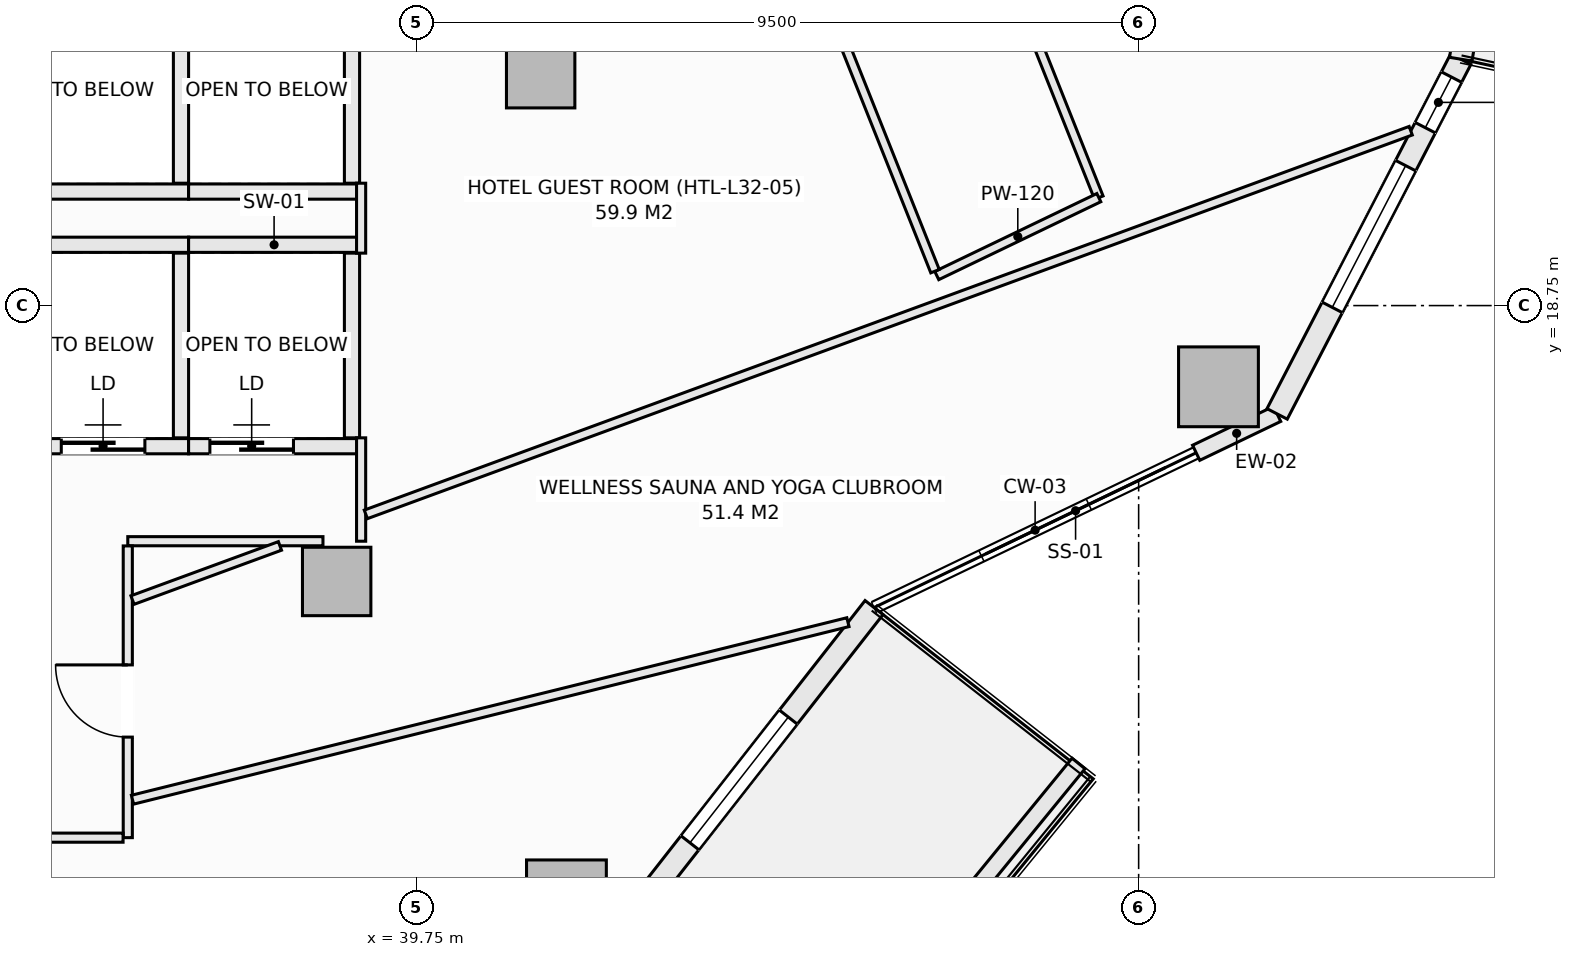
"""IFC4 building model, lengths in metres.
Left out: names, types, materials, properties, quantities, classifications, styles, units other than length and angle.
Written with IfcOpenShell. Run it as: python <this file> out.ifc"""

import sys

from ifc_helpers import new_model, si_unit, direction, frame, frame_2d, origin, origin_2d, place, context, subcontext, project, spatial, rectangle, extrude, element, fill, save


model = new_model("IFC4")
c1 = context("Model", 3, precision=1e-05, world=origin(), true_north=direction((0.0, 1.0)))
c2 = subcontext(c1, "Body", "Model", "MODEL_VIEW")
j1 = project(units=[si_unit("LENGTHUNIT", "METRE"), si_unit("PLANEANGLEUNIT", "RADIAN")], contexts=[c1])
p1 = place(None, origin())
s1 = spatial("IfcSite", under=j1, at=p1, CompositionType="ELEMENT")
p2 = place(p1, origin())
s2 = spatial("IfcBuilding", under=s1, at=p2, CompositionType="ELEMENT")
p3 = place(p2, frame((0.0, 0.0, 129.1)))
s3 = spatial("IfcBuildingStorey", under=s2, at=p3, CompositionType="ELEMENT", Elevation=129.1)
for number, where, z_axis, x_axis in (
    (1, (41.721, 10.932, -0.27), (0.0, 0.0, 1.0), (1.0, 0.0, 0.0)),
    (2, (50.3, 17.681, -0.27), (0.0, 0.0, 1.0), (1.0, 0.0, 0.0)),
):
    element("IfcColumn", number, at=place(p3, frame(where, z_axis=z_axis, x_axis=x_axis)), inside=s3, PredefinedType="COLUMN", context=c2, shape_type="SweptSolid", body=[
        extrude(rectangle(XDim=1.05, YDim=1.05, at=origin_2d()), origin(), (0.0, 0.0, 1.0), 3.4),
    ])
for number, where, z_axis, x_axis in (
    (3, (38.698, 15.121, -0.27), (0.0, 0.0, 1.0), (1.0, 0.0, 0.0)),
    (4, (41.382, 21.801, -0.27), (0.0, 0.0, 1.0), (1.0, 0.0, 0.0)),
):
    element("IfcColumn", number, at=place(p3, frame(where, z_axis=z_axis, x_axis=x_axis)), inside=s3, PredefinedType="COLUMN", context=c2, shape_type="SweptSolid", body=[
        extrude(rectangle(XDim=0.9, YDim=0.9, at=origin_2d()), origin(), (0.0, 0.0, 1.0), 3.4),
    ])
p4 = place(p3, frame((42.219, 10.242, 0.0), z_axis=(0.0, 0.0, 1.0), x_axis=(0.616435134162, 0.787405693001, 0.0)))
e5 = element("IfcWall", 5, at=p4, inside=s3, PredefinedType="SOLIDWALL", context=c2, shape_type="SweptSolid", body=[
    extrude(rectangle(XDim=5.759, YDim=0.3, at=frame_2d((2.879, 0.0))), origin(), (0.0, 0.0, 1.0), 2.653),
])
p5 = place(p4, frame((1.829, 0.0, 0.74)))
e6 = element("IfcOpeningElement", 6, at=p5, cuts=e5, PredefinedType="OPENING", context=c2, shape_type="SweptSolid", body=[
    extrude(rectangle(XDim=2.1, YDim=1.7, at=frame_2d((1.05, 0.85))), frame((0.0, 0.16, 0.0), z_axis=(0.0, -1.0, 0.0), x_axis=(1.0, 0.0, 0.0)), (0.0, 0.0, 1.0), 0.32),
])
p6 = place(p3, frame((50.007, 16.813, 0.0), z_axis=(0.0, 0.0, 1.0), x_axis=(0.90138115854, 0.433026566193, 0.0)))
e7 = element("IfcWall", 7, at=p6, inside=s3, PredefinedType="SOLIDWALL", context=c2, shape_type="SweptSolid", body=[
    extrude(rectangle(XDim=1.182, YDim=0.22, at=frame_2d((0.591, 0.0))), origin(), (0.0, 0.0, 1.0), 2.653),
])
p7 = place(p3, frame((51.072, 17.325, 0.0), z_axis=(0.0, 0.0, 1.0), x_axis=(0.459767899643, 0.888039119892, 0.0)))
e8 = element("IfcWall", 8, at=p7, inside=s3, PredefinedType="SOLIDWALL", context=c2, shape_type="SweptSolid", body=[
    extrude(rectangle(XDim=5.255, YDim=0.3, at=frame_2d((2.628, 0.0))), origin(), (0.0, 0.0, 1.0), 2.653),
])
p8 = place(p7, frame((1.578, 0.0, 0.74)))
e9 = element("IfcOpeningElement", 9, at=p8, cuts=e8, PredefinedType="OPENING", context=c2, shape_type="SweptSolid", body=[
    extrude(rectangle(XDim=2.1, YDim=1.7, at=frame_2d((1.05, 0.85))), frame((0.0, 0.16, 0.0), z_axis=(0.0, -1.0, 0.0), x_axis=(1.0, 0.0, 0.0)), (0.0, 0.0, 1.0), 0.32),
])
p9 = place(p7, frame((4.24, 0.0, 0.72)))
e10 = element("IfcOpeningElement", 10, at=p9, cuts=e8, PredefinedType="OPENING", context=c2, shape_type="SweptSolid", body=[
    extrude(rectangle(XDim=0.75, YDim=1.65, at=frame_2d((0.375, 0.825))), frame((0.0, 0.16, 0.0), z_axis=(0.0, -1.0, 0.0), x_axis=(1.0, 0.0, 0.0)), (0.0, 0.0, 1.0), 0.32),
])
p10 = place(p3, frame((53.488, 21.992, 0.0), z_axis=(0.0, 0.0, 1.0), x_axis=(0.162393944769, 0.986726003864, 0.0)))
e11 = element("IfcWall", 11, at=p10, inside=s3, PredefinedType="SOLIDWALL", context=c2, shape_type="SweptSolid", body=[
    extrude(rectangle(XDim=5.075, YDim=0.3, at=frame_2d((2.538, 0.0))), origin(), (0.0, 0.0, 1.0), 2.653),
])
p11 = place(p10, frame((2.78, 0.0, 0.72)))
e12 = element("IfcOpeningElement", 12, at=p11, cuts=e11, PredefinedType="OPENING", context=c2, shape_type="SweptSolid", body=[
    extrude(rectangle(XDim=1.2, YDim=1.65, at=frame_2d((0.6, 0.825))), frame((0.0, 0.16, 0.0), z_axis=(0.0, -1.0, 0.0), x_axis=(1.0, 0.0, 0.0)), (0.0, 0.0, 1.0), 0.32),
])
p12 = place(p3, frame((44.167, 7.477, 0.0), z_axis=(0.0, 0.0, 1.0), x_axis=(0.633002467947, 0.77414977593, 0.0)))
e13 = element("IfcWall", 13, at=p12, inside=s3, PredefinedType="PARAPET", context=c2, shape_type="SweptSolid", body=[
    extrude(rectangle(XDim=6.78, YDim=0.22, at=frame_2d((3.39, 0.0))), origin(), (0.0, 0.0, 1.0), 0.52),
])
p13 = place(p3, frame((34.5, 19.55, 0.0), z_axis=(0.0, 0.0, 1.0), x_axis=(1.0, 0.0, 0.0)))
e14 = element("IfcWall", 14, at=p13, inside=s3, PredefinedType="SOLIDWALL", context=c2, shape_type="SweptSolid", body=[
    extrude(rectangle(XDim=2.25, YDim=0.2, at=frame_2d((1.125, 0.0))), origin(), (0.0, 0.0, 1.0), 3.13),
])
p14 = place(p3, frame((34.5, 16.9, 0.0), z_axis=(0.0, 0.0, 1.0), x_axis=(1.0, 0.0, 0.0)))
e15 = element("IfcWall", 15, at=p14, inside=s3, PredefinedType="SOLIDWALL", context=c2, shape_type="SweptSolid", body=[
    extrude(rectangle(XDim=2.25, YDim=0.2, at=frame_2d((1.125, 0.0))), origin(), (0.0, 0.0, 1.0), 3.13),
])
p15 = place(p14, frame((0.575, 0.0, 0.0)))
e16 = element("IfcOpeningElement", 16, at=p15, cuts=e15, PredefinedType="OPENING", context=c2, shape_type="SweptSolid", body=[
    extrude(rectangle(XDim=1.1, YDim=2.2, at=frame_2d((0.55, 1.1))), frame((0.0, 0.11, 0.0), z_axis=(0.0, -1.0, 0.0), x_axis=(1.0, 0.0, 0.0)), (0.0, 0.0, 1.0), 0.22),
])
p16 = place(p3, frame((36.65, 17.01, 0.0), z_axis=(0.0, 0.0, 1.0), x_axis=(0.0, 1.0, 0.0)))
e17 = element("IfcWall", 17, at=p16, inside=s3, PredefinedType="SOLIDWALL", context=c2, shape_type="SweptSolid", body=[
    extrude(rectangle(XDim=2.43, YDim=0.2, at=frame_2d((1.215, 0.0))), origin(), (0.0, 0.0, 1.0), 3.13),
])
p17 = place(p3, frame((36.75, 19.55, 0.0), z_axis=(0.0, 0.0, 1.0), x_axis=(1.0, 0.0, 0.0)))
e18 = element("IfcWall", 18, at=p17, inside=s3, PredefinedType="SOLIDWALL", context=c2, shape_type="SweptSolid", body=[
    extrude(rectangle(XDim=2.25, YDim=0.2, at=frame_2d((1.125, 0.0))), origin(), (0.0, 0.0, 1.0), 3.13),
])
p18 = place(p3, frame((36.75, 16.9, 0.0), z_axis=(0.0, 0.0, 1.0), x_axis=(1.0, 0.0, 0.0)))
e19 = element("IfcWall", 19, at=p18, inside=s3, PredefinedType="SOLIDWALL", context=c2, shape_type="SweptSolid", body=[
    extrude(rectangle(XDim=2.25, YDim=0.2, at=frame_2d((1.125, 0.0))), origin(), (0.0, 0.0, 1.0), 3.13),
])
p19 = place(p18, frame((0.28, 0.0, 0.0)))
e20 = element("IfcOpeningElement", 20, at=p19, cuts=e19, PredefinedType="OPENING", context=c2, shape_type="SweptSolid", body=[
    extrude(rectangle(XDim=1.1, YDim=2.2, at=frame_2d((0.55, 1.1))), frame((0.0, 0.11, 0.0), z_axis=(0.0, -1.0, 0.0), x_axis=(1.0, 0.0, 0.0)), (0.0, 0.0, 1.0), 0.22),
])
p20 = place(p3, frame((38.9, 17.01, 0.0), z_axis=(0.0, 0.0, 1.0), x_axis=(0.0, 1.0, 0.0)))
e21 = element("IfcWall", 21, at=p20, inside=s3, PredefinedType="SOLIDWALL", context=c2, shape_type="SweptSolid", body=[
    extrude(rectangle(XDim=2.43, YDim=0.2, at=frame_2d((1.215, 0.0))), origin(), (0.0, 0.0, 1.0), 3.13),
])
p21 = place(p3, frame((34.5, 20.25, 0.0), z_axis=(0.0, 0.0, 1.0), x_axis=(1.0, 0.0, 0.0)))
e22 = element("IfcWall", 22, at=p21, inside=s3, PredefinedType="SOLIDWALL", context=c2, shape_type="SweptSolid", body=[
    extrude(rectangle(XDim=2.25, YDim=0.2, at=frame_2d((1.125, 0.0))), origin(), (0.0, 0.0, 1.0), 3.13),
])
p22 = place(p3, frame((36.65, 20.36, 0.0), z_axis=(0.0, 0.0, 1.0), x_axis=(0.0, 1.0, 0.0)))
e23 = element("IfcWall", 23, at=p22, inside=s3, PredefinedType="SOLIDWALL", context=c2, shape_type="SweptSolid", body=[
    extrude(rectangle(XDim=2.43, YDim=0.2, at=frame_2d((1.215, 0.0))), origin(), (0.0, 0.0, 1.0), 3.13),
])
p23 = place(p3, frame((36.75, 20.25, 0.0), z_axis=(0.0, 0.0, 1.0), x_axis=(1.0, 0.0, 0.0)))
e24 = element("IfcWall", 24, at=p23, inside=s3, PredefinedType="SOLIDWALL", context=c2, shape_type="SweptSolid", body=[
    extrude(rectangle(XDim=2.25, YDim=0.2, at=frame_2d((1.125, 0.0))), origin(), (0.0, 0.0, 1.0), 3.13),
])
p24 = place(p3, frame((38.9, 20.36, 0.0), z_axis=(0.0, 0.0, 1.0), x_axis=(0.0, 1.0, 0.0)))
e25 = element("IfcWall", 25, at=p24, inside=s3, PredefinedType="SOLIDWALL", context=c2, shape_type="SweptSolid", body=[
    extrude(rectangle(XDim=2.43, YDim=0.2, at=frame_2d((1.215, 0.0))), origin(), (0.0, 0.0, 1.0), 3.13),
])
p25 = place(p3, frame((39.02, 15.65, 0.0), z_axis=(0.0, 0.0, 1.0), x_axis=(0.0, 1.0, 0.0)))
e26 = element("IfcWall", 26, at=p25, inside=s3, PredefinedType="PARTITIONING", context=c2, shape_type="SweptSolid", body=[
    extrude(rectangle(XDim=1.36, YDim=0.12, at=frame_2d((0.68, 0.0))), origin(), (0.0, 0.0, 1.0), 2.505),
])
p26 = place(p3, frame((39.02, 19.44, 0.0), z_axis=(0.0, 0.0, 1.0), x_axis=(0.0, 1.0, 0.0)))
e27 = element("IfcWall", 27, at=p26, inside=s3, PredefinedType="PARTITIONING", context=c2, shape_type="SweptSolid", body=[
    extrude(rectangle(XDim=0.92, YDim=0.12, at=frame_2d((0.46, 0.0))), origin(), (0.0, 0.0, 1.0), 3.13),
])
p27 = place(p3, frame((35.95, 15.65, 0.0), z_axis=(0.0, 0.0, 1.0), x_axis=(1.0, 0.0, 0.0)))
e28 = element("IfcWall", 28, at=p27, inside=s3, PredefinedType="PARTITIONING", context=c2, shape_type="SweptSolid", body=[
    extrude(rectangle(XDim=2.568, YDim=0.12, at=frame_2d((1.284, 0.0))), origin(), (0.0, 0.0, 1.0), 3.13),
])
p28 = place(p3, frame((35.95, 11.75, 0.0), z_axis=(0.0, 0.0, 1.0), x_axis=(0.0, 1.0, 0.0)))
e29 = element("IfcWall", 29, at=p28, inside=s3, PredefinedType="PARTITIONING", context=c2, shape_type="SweptSolid", body=[
    extrude(rectangle(XDim=3.838, YDim=0.12, at=frame_2d((1.919, 0.0))), origin(), (0.0, 0.0, 1.0), 3.13),
])
p29 = place(p28, frame((1.323, 0.0, 0.0)))
e30 = element("IfcOpeningElement", 30, at=p29, cuts=e29, PredefinedType="OPENING", context=c2, shape_type="SweptSolid", body=[
    extrude(rectangle(XDim=0.95, YDim=2.1, at=frame_2d((0.475, 1.05))), frame((0.0, 0.07, 0.0), z_axis=(0.0, -1.0, 0.0), x_axis=(1.0, 0.0, 0.0)), (0.0, 0.0, 1.0), 0.14),
])
p30 = place(p3, frame((27.227, 11.75, 0.0), z_axis=(0.0, 0.0, 1.0), x_axis=(1.0, 0.0, 0.0)))
e31 = element("IfcWall", 31, at=p30, inside=s3, PredefinedType="PARTITIONING", context=c2, shape_type="SweptSolid", body=[
    extrude(rectangle(XDim=8.661, YDim=0.12, at=frame_2d((4.331, 0.0))), origin(), (0.0, 0.0, 1.0), 3.13),
])
p31 = place(p30, frame((6.659, 0.0, 0.0)))
e32 = element("IfcOpeningElement", 32, at=p31, cuts=e31, PredefinedType="OPENING", context=c2, shape_type="SweptSolid", body=[
    extrude(rectangle(XDim=0.95, YDim=2.1, at=frame_2d((0.475, 1.05))), frame((0.0, 0.07, 0.0), z_axis=(0.0, -1.0, 0.0), x_axis=(1.0, 0.0, 0.0)), (0.0, 0.0, 1.0), 0.14),
])
p32 = place(p3, frame((46.946, 24.637, 0.0), z_axis=(0.0, 0.0, 1.0), x_axis=(0.370173596818, -0.928962597858, 0.0)))
e33 = element("IfcWall", 33, at=p32, inside=s3, PredefinedType="PARTITIONING", context=c2, shape_type="SweptSolid", body=[
    extrude(rectangle(XDim=4.809, YDim=0.12, at=frame_2d((2.404, 0.0))), origin(), (0.0, 0.0, 1.0), 3.13),
])
p33 = place(p3, frame((46.594, 19.145, 0.0), z_axis=(0.0, 0.0, 1.0), x_axis=(0.901274899261, 0.433247684312, 0.0)))
e34 = element("IfcWall", 34, at=p33, inside=s3, PredefinedType="PARTITIONING", context=c2, shape_type="SweptSolid", body=[
    extrude(rectangle(XDim=2.366, YDim=0.12, at=frame_2d((1.183, 0.0))), origin(), (0.0, 0.0, 1.0), 3.13),
])
p34 = place(p3, frame((45.05, 23.02, 0.0), z_axis=(0.0, 0.0, 1.0), x_axis=(0.370140626192, -0.928975735335, 0.0)))
e35 = element("IfcWall", 35, at=p34, inside=s3, PredefinedType="PARTITIONING", context=c2, shape_type="SweptSolid", body=[
    extrude(rectangle(XDim=4.109, YDim=0.12, at=frame_2d((2.055, 0.0))), origin(), (0.0, 0.0, 1.0), 3.13),
])
p35 = place(p3, frame((36.012, 14.876, 0.0), z_axis=(0.0, 0.0, 1.0), x_axis=(0.938757901669, 0.344577425339, 0.0)))
e36 = element("IfcWall", 36, at=p35, inside=s3, PredefinedType="PARTITIONING", context=c2, shape_type="SweptSolid", body=[
    extrude(rectangle(XDim=2.067, YDim=0.12, at=frame_2d((1.033, 0.0))), origin(), (0.0, 0.0, 1.0), 2.505),
])
p36 = place(p3, frame((39.082, 16.003, 0.0), z_axis=(0.0, 0.0, 1.0), x_axis=(0.93872535699, 0.344666076288, 0.0)))
e37 = element("IfcWall", 37, at=p36, inside=s3, PredefinedType="PARTITIONING", context=c2, shape_type="SweptSolid", body=[
    extrude(rectangle(XDim=14.645, YDim=0.12, at=frame_2d((7.323, 0.0))), origin(), (0.0, 0.0, 1.0), 3.13),
])
p37 = place(p3, frame((36.012, 12.249, 0.0), z_axis=(0.0, 0.0, 1.0), x_axis=(0.970568919411, 0.24082353015, 0.0)))
e38 = element("IfcWall", 38, at=p37, inside=s3, PredefinedType="PARTITIONING", context=c2, shape_type="SweptSolid", body=[
    extrude(rectangle(XDim=9.699, YDim=0.12, at=frame_2d((4.849, 0.0))), origin(), (0.0, 0.0, 1.0), 3.13),
])
p38 = place(p5, origin())
e39 = element("IfcWindow", 39, at=p38, inside=s3, PartitioningType="SINGLE_PANEL", PredefinedType="WINDOW", context=c2, shape_type="SweptSolid", body=[
    extrude(rectangle(XDim=2.1, YDim=1.7, at=frame_2d((1.05, 0.85))), frame((0.0, 0.03, 0.0), z_axis=(0.0, -1.0, 0.0), x_axis=(1.0, 0.0, 0.0)), (0.0, 0.0, 1.0), 0.06),
])
fill(e6, e39)
p39 = place(p8, origin())
e40 = element("IfcWindow", 40, at=p39, inside=s3, PartitioningType="SINGLE_PANEL", PredefinedType="WINDOW", context=c2, shape_type="SweptSolid", body=[
    extrude(rectangle(XDim=2.1, YDim=1.7, at=frame_2d((1.05, 0.85))), frame((0.0, 0.03, 0.0), z_axis=(0.0, -1.0, 0.0), x_axis=(1.0, 0.0, 0.0)), (0.0, 0.0, 1.0), 0.06),
])
fill(e9, e40)
p40 = place(p15, origin())
e41 = element("IfcDoor", 41, at=p40, inside=s3, OperationType="SLIDING_TO_LEFT", PredefinedType="DOOR", context=c2, shape_type="SweptSolid", body=[
    extrude(rectangle(XDim=1.1, YDim=2.2, at=frame_2d((0.55, 1.1))), frame((0.0, 0.025, 0.0), z_axis=(0.0, -1.0, 0.0), x_axis=(1.0, 0.0, 0.0)), (0.0, 0.0, 1.0), 0.05),
])
fill(e16, e41)
p41 = place(p19, origin())
e42 = element("IfcDoor", 42, at=p41, inside=s3, OperationType="SLIDING_TO_LEFT", PredefinedType="DOOR", context=c2, shape_type="SweptSolid", body=[
    extrude(rectangle(XDim=1.1, YDim=2.2, at=frame_2d((0.55, 1.1))), frame((0.0, 0.025, 0.0), z_axis=(0.0, -1.0, 0.0), x_axis=(1.0, 0.0, 0.0)), (0.0, 0.0, 1.0), 0.05),
])
fill(e20, e42)
p42 = place(p29, origin())
e43 = element("IfcDoor", 43, at=p42, inside=s3, OperationType="SINGLE_SWING_RIGHT", PredefinedType="DOOR", context=c2, shape_type="SweptSolid", body=[
    extrude(rectangle(XDim=0.95, YDim=2.1, at=frame_2d((0.475, 1.05))), frame((0.0, 0.025, 0.0), z_axis=(0.0, -1.0, 0.0), x_axis=(1.0, 0.0, 0.0)), (0.0, 0.0, 1.0), 0.05),
])
fill(e30, e43)
p43 = place(p9, origin())
e44 = element("IfcWindow", 44, at=p43, inside=s3, PartitioningType="SINGLE_PANEL", PredefinedType="WINDOW", context=c2, shape_type="SweptSolid", body=[
    extrude(rectangle(XDim=0.75, YDim=1.65, at=frame_2d((0.375, 0.825))), frame((0.0, 0.03, 0.0), z_axis=(0.0, -1.0, 0.0), x_axis=(1.0, 0.0, 0.0)), (0.0, 0.0, 1.0), 0.06),
])
fill(e10, e44)
save(model, sys.argv[1])
